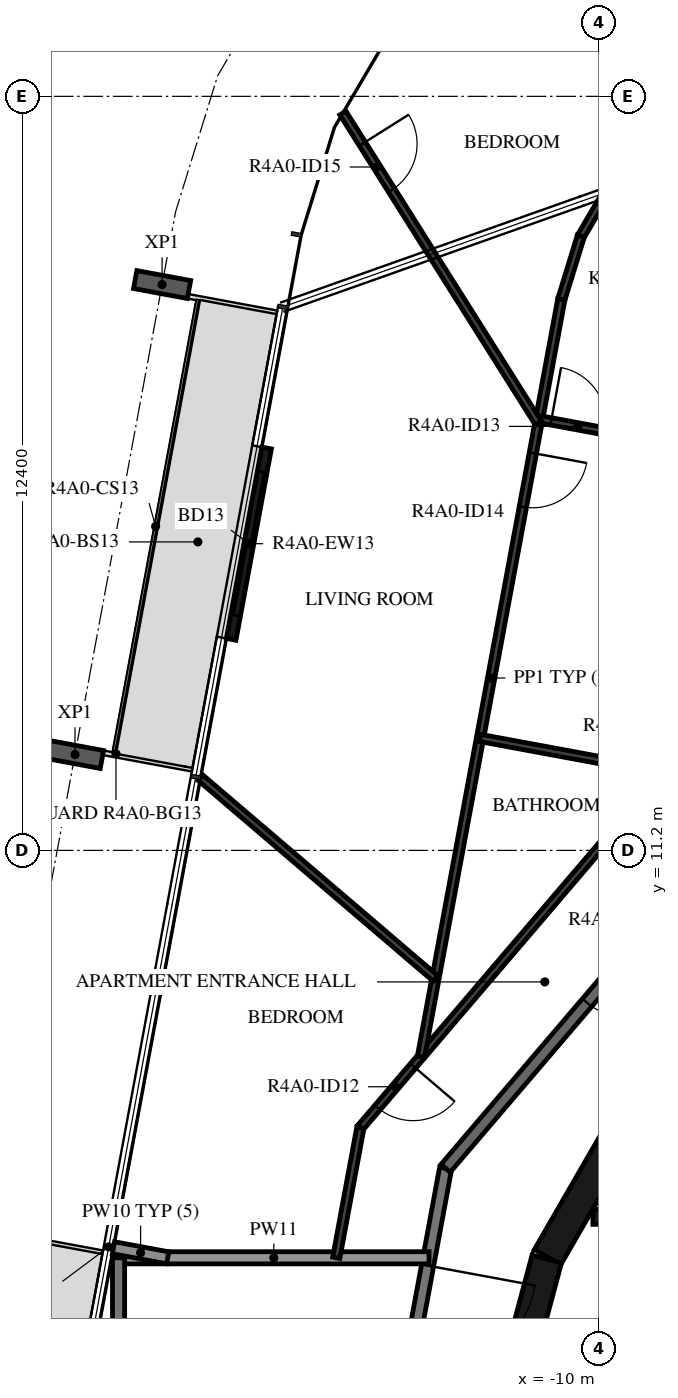
"""IFC4 building model, lengths in metres.
Left out: names, types, materials, properties, quantities, classifications, styles, units other than length and angle.
Written with IfcOpenShell. Run it as: python <this file> out.ifc"""

import sys

from ifc_helpers import new_model, si_unit, direction, frame, frame_2d, origin, origin_2d, place, context, subcontext, project, spatial, rectangle, i_section, extrude, element, fill, save


model = new_model("IFC4")
c1 = context("Model", 3, precision=1e-05, world=origin(), true_north=direction((0.0, 1.0)))
c2 = subcontext(c1, "Body", "Model", "MODEL_VIEW")
j1 = project(units=[si_unit("LENGTHUNIT", "METRE"), si_unit("PLANEANGLEUNIT", "RADIAN")], contexts=[c1])
p1 = place(None, origin())
s1 = spatial("IfcSite", under=j1, at=p1, CompositionType="ELEMENT")
p2 = place(p1, origin())
s2 = spatial("IfcBuilding", under=s1, at=p2, CompositionType="ELEMENT")
p3 = place(p2, frame((0.0, 0.0, 158.7)))
s3 = spatial("IfcBuildingStorey", under=s2, at=p3, CompositionType="ELEMENT", Elevation=158.7)
for number, where, z_axis, x_axis in (
    (1, (-17.184, 20.505, -0.38), (0.0, 0.0, 1.0), (0.182, 0.983, 0.0)),
    (2, (-18.616, 12.777, -0.38), (0.0, 0.0, 1.0), (0.182, 0.983, 0.0)),
):
    element("IfcColumn", number, at=place(p3, frame(where, z_axis=z_axis, x_axis=x_axis)), inside=s3, PredefinedType="COLUMN", context=c2, shape_type="SweptSolid", body=[
        extrude(i_section(OverallWidth=0.3, OverallDepth=0.9, WebThickness=0.019, FlangeThickness=0.035, FilletRadius=0.03, at=origin_2d()), origin(), (0.0, 0.0, 1.0), 3.5),
    ])
p4 = place(p3, frame((-15.465, 17.817, 0.0), z_axis=(0.0, 0.0, 1.0), x_axis=(-0.182201278434, -0.983261254264, 0.0)))
e3 = element("IfcWall", 3, at=p4, inside=s3, PredefinedType="STANDARD", context=c2, shape_type="SweptSolid", body=[
    extrude(rectangle(XDim=3.2, YDim=0.16, at=frame_2d((1.6, 0.0))), origin(), (0.0, 0.0, 1.0), 3.12),
])
p5 = place(p4, frame((0.4, 0.0, 0.0)))
e4 = element("IfcOpeningElement", 4, at=p5, cuts=e3, PredefinedType="OPENING", context=c2, shape_type="SweptSolid", body=[
    extrude(rectangle(XDim=2.4, YDim=2.4, at=frame_2d((1.2, 1.2))), frame((0.0, 0.09, 0.0), z_axis=(0.0, -1.0, 0.0), x_axis=(1.0, 0.0, 0.0)), (0.0, 0.0, 1.0), 0.18),
])
for number, where, z_axis, x_axis in (
    (5, (-9.329, 7.137, 0.0), (0.0, 0.0, 1.0), (-0.5, -0.866, 0.0)),
    (6, (-10.858, 4.479, 0.0), (0.0, 0.0, 1.0), (-0.259, -0.966, 0.0)),
):
    element("IfcWall", number, at=place(p3, frame(where, z_axis=z_axis, x_axis=x_axis)), inside=s3, PredefinedType="SHEAR", context=c2, shape_type="SweptSolid", body=[
        extrude(rectangle(XDim=3.033, YDim=0.5, at=frame_2d((1.516, 0.0))), origin(), (0.0, 0.0, 1.0), 3.12),
    ])
p6 = place(p3, frame((-7.0, 5.175, 0.0), z_axis=(0.0, 0.0, 1.0), x_axis=(-1.0, 0.0, 0.0)))
e7 = element("IfcWall", 7, at=p6, inside=s3, PredefinedType="SHEAR", context=c2, shape_type="SweptSolid", body=[
    extrude(rectangle(XDim=3.1, YDim=0.25, at=frame_2d((1.55, 0.0))), origin(), (0.0, 0.0, 1.0), 3.12),
])
p7 = place(p3, frame((-12.521, 5.972, 0.0), z_axis=(0.0, 0.0, 1.0), x_axis=(-0.182251559718, -0.983251935661, 0.0)))
e8 = element("IfcWall", 8, at=p7, inside=s3, PredefinedType="STANDARD", context=c2, shape_type="SweptSolid", body=[
    extrude(rectangle(XDim=5.117, YDim=0.2, at=frame_2d((2.559, 0.0))), origin(), (0.0, 0.0, 1.0), 3.12),
])
p8 = place(p7, frame((1.627, 0.0, 0.0)))
e9 = element("IfcOpeningElement", 9, at=p8, cuts=e8, PredefinedType="OPENING", context=c2, shape_type="SweptSolid", body=[
    extrude(rectangle(XDim=1.8, YDim=2.1, at=frame_2d((0.9, 1.05))), frame((0.0, 0.11, 0.0), z_axis=(0.0, -1.0, 0.0), x_axis=(1.0, 0.0, 0.0)), (0.0, 0.0, 1.0), 0.22),
])
p9 = place(p3, frame((-7.858, 11.433, 0.0), z_axis=(0.0, 0.0, 1.0), x_axis=(-0.649440801937, -0.760412154545, 0.0)))
e10 = element("IfcWall", 10, at=p9, inside=s3, PredefinedType="STANDARD", context=c2, shape_type="SweptSolid", body=[
    extrude(rectangle(XDim=7.181, YDim=0.2, at=frame_2d((3.59, 0.0))), origin(), (0.0, 0.0, 1.0), 3.12),
])
p10 = place(p9, frame((2.6, 0.0, 0.0)))
e11 = element("IfcOpeningElement", 11, at=p10, cuts=e10, PredefinedType="OPENING", context=c2, shape_type="SweptSolid", body=[
    extrude(rectangle(XDim=1.0, YDim=2.1, at=frame_2d((0.5, 1.05))), frame((0.0, 0.11, 0.0), z_axis=(0.0, -1.0, 0.0), x_axis=(1.0, 0.0, 0.0)), (0.0, 0.0, 1.0), 0.22),
])
p11 = place(p3, frame((-12.794, 4.5, 0.0), z_axis=(0.0, 0.0, 1.0), x_axis=(-1.0, 0.0, 0.0)))
e12 = element("IfcWall", 12, at=p11, inside=s3, PredefinedType="STANDARD", context=c2, shape_type="SweptSolid", body=[
    extrude(rectangle(XDim=5.106, YDim=0.2, at=frame_2d((2.553, 0.0))), origin(), (0.0, 0.0, 1.0), 2.73),
])
p12 = place(p3, frame((-17.9, 4.5, 0.0), z_axis=(0.0, 0.0, 1.0), x_axis=(0.0, -1.0, 0.0)))
e13 = element("IfcWall", 13, at=p12, inside=s3, PredefinedType="STANDARD", context=c2, shape_type="SweptSolid", body=[
    extrude(rectangle(XDim=9.0, YDim=0.2, at=frame_2d((4.5, 0.0))), origin(), (0.0, 0.0, 1.0), 3.12),
])
p13 = place(p3, frame((-17.984, 4.665, 0.0), z_axis=(0.0, 0.0, 1.0), x_axis=(0.98328378843, -0.182079629313, 0.0)))
e14 = element("IfcWall", 14, at=p13, inside=s3, PredefinedType="STANDARD", context=c2, shape_type="SweptSolid", body=[
    extrude(rectangle(XDim=0.908, YDim=0.2, at=frame_2d((0.454, 0.0))), origin(), (0.0, 0.0, 1.0), 2.73),
])
p14 = place(p3, frame((-8.929, 12.488, 0.0), z_axis=(0.0, 0.0, 1.0), x_axis=(-0.64944646045, -0.760407321775, 0.0)))
e15 = element("IfcWall", 15, at=p14, inside=s3, PredefinedType="PARTITIONING", context=c2, shape_type="SweptSolid", body=[
    extrude(rectangle(XDim=7.69, YDim=0.12, at=frame_2d((3.845, 0.0))), origin(), (0.0, 0.0, 1.0), 3.12),
])
p15 = place(p14, frame((0.4, 0.0, 0.0)))
e16 = element("IfcOpeningElement", 16, at=p15, cuts=e15, PredefinedType="OPENING", context=c2, shape_type="SweptSolid", body=[
    extrude(rectangle(XDim=0.8, YDim=2.1, at=frame_2d((0.4, 1.05))), frame((0.0, 0.07, 0.0), z_axis=(0.0, -1.0, 0.0), x_axis=(1.0, 0.0, 0.0)), (0.0, 0.0, 1.0), 0.14),
])
p16 = place(p14, frame((6.356, 0.0, 0.0)))
e17 = element("IfcOpeningElement", 17, at=p16, cuts=e15, PredefinedType="OPENING", context=c2, shape_type="SweptSolid", body=[
    extrude(rectangle(XDim=0.9, YDim=2.1, at=frame_2d((0.45, 1.05))), frame((0.0, 0.07, 0.0), z_axis=(0.0, -1.0, 0.0), x_axis=(1.0, 0.0, 0.0)), (0.0, 0.0, 1.0), 0.14),
])
p17 = place(p3, frame((-13.923, 6.641, 0.0), z_axis=(0.0, 0.0, 1.0), x_axis=(-0.182209715759, -0.983259690765, 0.0)))
e18 = element("IfcWall", 18, at=p17, inside=s3, PredefinedType="PARTITIONING", context=c2, shape_type="SweptSolid", body=[
    extrude(rectangle(XDim=2.177, YDim=0.12, at=frame_2d((1.089, 0.0))), origin(), (0.0, 0.0, 1.0), 3.12),
])
p18 = place(p3, frame((-9.877, 22.014, 0.0), z_axis=(0.0, 0.0, 1.0), x_axis=(-0.507766478099, -0.861494749676, 0.0)))
e19 = element("IfcWall", 19, at=p18, inside=s3, PredefinedType="PARTITIONING", context=c2, shape_type="SweptSolid", body=[
    extrude(rectangle(XDim=0.829, YDim=0.12, at=frame_2d((0.415, 0.0))), origin(), (0.0, 0.0, 1.0), 3.12),
])
p19 = place(p3, frame((-10.298, 21.3, 0.0), z_axis=(0.0, 0.0, 1.0), x_axis=(-0.295127342945, -0.955457927617, 0.0)))
e20 = element("IfcWall", 20, at=p19, inside=s3, PredefinedType="PARTITIONING", context=c2, shape_type="SweptSolid", body=[
    extrude(rectangle(XDim=1.087, YDim=0.12, at=frame_2d((0.543, 0.0))), origin(), (0.0, 0.0, 1.0), 3.12),
])
p20 = place(p3, frame((-10.618, 20.262, 0.0), z_axis=(0.0, 0.0, 1.0), x_axis=(-0.182222468274, -0.983257327487, 0.0)))
e21 = element("IfcWall", 21, at=p20, inside=s3, PredefinedType="PARTITIONING", context=c2, shape_type="SweptSolid", body=[
    extrude(rectangle(XDim=12.667, YDim=0.12, at=frame_2d((6.333, 0.0))), origin(), (0.0, 0.0, 1.0), 3.12),
])
p21 = place(p20, frame((2.57, 0.0, 0.0)))
e22 = element("IfcOpeningElement", 22, at=p21, cuts=e21, PredefinedType="OPENING", context=c2, shape_type="SweptSolid", body=[
    extrude(rectangle(XDim=0.9, YDim=2.1, at=frame_2d((0.45, 1.05))), frame((0.0, 0.07, 0.0), z_axis=(0.0, -1.0, 0.0), x_axis=(1.0, 0.0, 0.0)), (0.0, 0.0, 1.0), 0.14),
])
p22 = place(p3, frame((-10.984, 18.291, 0.0), z_axis=(0.0, 0.0, 1.0), x_axis=(0.98324782266, -0.182273748068, 0.0)))
e23 = element("IfcWall", 23, at=p22, inside=s3, PredefinedType="PARTITIONING", context=c2, shape_type="SweptSolid", body=[
    extrude(rectangle(XDim=4.881, YDim=0.12, at=frame_2d((2.44, 0.0))), origin(), (0.0, 0.0, 1.0), 3.12),
])
p23 = place(p22, frame((0.2, 0.0, 0.0)))
e24 = element("IfcOpeningElement", 24, at=p23, cuts=e23, PredefinedType="OPENING", context=c2, shape_type="SweptSolid", body=[
    extrude(rectangle(XDim=0.9, YDim=2.1, at=frame_2d((0.45, 1.05))), frame((0.0, 0.07, 0.0), z_axis=(0.0, -1.0, 0.0), x_axis=(1.0, 0.0, 0.0)), (0.0, 0.0, 1.0), 0.14),
])
p24 = place(p3, frame((-14.211, 23.326, 0.0), z_axis=(0.0, 0.0, 1.0), x_axis=(0.533278244906, -0.845939899467, 0.0)))
e25 = element("IfcWall", 25, at=p24, inside=s3, PredefinedType="PARTITIONING", context=c2, shape_type="SweptSolid", body=[
    extrude(rectangle(XDim=6.029, YDim=0.12, at=frame_2d((3.014, 0.0))), origin(), (0.0, 0.0, 1.0), 3.12),
])
p25 = place(p24, frame((0.6, 0.0, 0.0)))
e26 = element("IfcOpeningElement", 26, at=p25, cuts=e25, PredefinedType="OPENING", context=c2, shape_type="SweptSolid", body=[
    extrude(rectangle(XDim=0.9, YDim=2.1, at=frame_2d((0.45, 1.05))), frame((0.0, 0.07, 0.0), z_axis=(0.0, -1.0, 0.0), x_axis=(1.0, 0.0, 0.0)), (0.0, 0.0, 1.0), 0.14),
])
p26 = place(p3, frame((-11.955, 13.049, 0.0), z_axis=(0.0, 0.0, 1.0), x_axis=(0.983247271586, -0.182276720725, 0.0)))
e27 = element("IfcWall", 27, at=p26, inside=s3, PredefinedType="PARTITIONING", context=c2, shape_type="SweptSolid", body=[
    extrude(rectangle(XDim=3.078, YDim=0.12, at=frame_2d((1.539, 0.0))), origin(), (0.0, 0.0, 1.0), 3.12),
])
p27 = place(p3, frame((-16.552, 12.394, 0.0), z_axis=(0.0, 0.0, 1.0), x_axis=(0.760425586578, -0.649425074414, 0.0)))
e28 = element("IfcWall", 28, at=p27, inside=s3, PredefinedType="PARTITIONING", context=c2, shape_type="SweptSolid", body=[
    extrude(rectangle(XDim=5.081, YDim=0.12, at=frame_2d((2.541, 0.0))), origin(), (0.0, 0.0, 1.0), 3.12),
])
p28 = place(p5, origin())
e29 = element("IfcDoor", 29, at=p28, inside=s3, OperationType="DOUBLE_DOOR_SLIDING", PredefinedType="DOOR", context=c2, shape_type="SweptSolid", body=[
    extrude(rectangle(XDim=2.4, YDim=2.4, at=frame_2d((1.2, 1.2))), frame((0.0, 0.025, 0.0), z_axis=(0.0, -1.0, 0.0), x_axis=(1.0, 0.0, 0.0)), (0.0, 0.0, 1.0), 0.05),
])
fill(e4, e29)
p29 = place(p10, origin())
e30 = element("IfcDoor", 30, at=p29, inside=s3, OperationType="SINGLE_SWING_LEFT", PredefinedType="DOOR", context=c2, shape_type="SweptSolid", body=[
    extrude(rectangle(XDim=1.0, YDim=2.1, at=frame_2d((0.5, 1.05))), frame((0.0, 0.025, 0.0), z_axis=(0.0, -1.0, 0.0), x_axis=(1.0, 0.0, 0.0)), (0.0, 0.0, 1.0), 0.05),
])
fill(e11, e30)
p30 = place(p16, origin())
e31 = element("IfcDoor", 31, at=p30, inside=s3, OperationType="SINGLE_SWING_LEFT", PredefinedType="DOOR", context=c2, shape_type="SweptSolid", body=[
    extrude(rectangle(XDim=0.9, YDim=2.1, at=frame_2d((0.45, 1.05))), frame((0.0, 0.025, 0.0), z_axis=(0.0, -1.0, 0.0), x_axis=(1.0, 0.0, 0.0)), (0.0, 0.0, 1.0), 0.05),
])
fill(e17, e31)
p31 = place(p23, origin())
e32 = element("IfcDoor", 32, at=p31, inside=s3, OperationType="SINGLE_SWING_LEFT", PredefinedType="DOOR", context=c2, shape_type="SweptSolid", body=[
    extrude(rectangle(XDim=0.9, YDim=2.1, at=frame_2d((0.45, 1.05))), frame((0.0, 0.025, 0.0), z_axis=(0.0, -1.0, 0.0), x_axis=(1.0, 0.0, 0.0)), (0.0, 0.0, 1.0), 0.05),
])
fill(e24, e32)
p32 = place(p21, origin())
e33 = element("IfcDoor", 33, at=p32, inside=s3, OperationType="SINGLE_SWING_LEFT", PredefinedType="DOOR", context=c2, shape_type="SweptSolid", body=[
    extrude(rectangle(XDim=0.9, YDim=2.1, at=frame_2d((0.45, 1.05))), frame((0.0, 0.025, 0.0), z_axis=(0.0, -1.0, 0.0), x_axis=(1.0, 0.0, 0.0)), (0.0, 0.0, 1.0), 0.05),
])
fill(e22, e33)
p33 = place(p25, origin())
e34 = element("IfcDoor", 34, at=p33, inside=s3, OperationType="SINGLE_SWING_LEFT", PredefinedType="DOOR", context=c2, shape_type="SweptSolid", body=[
    extrude(rectangle(XDim=0.9, YDim=2.1, at=frame_2d((0.45, 1.05))), frame((0.0, 0.025, 0.0), z_axis=(0.0, -1.0, 0.0), x_axis=(1.0, 0.0, 0.0)), (0.0, 0.0, 1.0), 0.05),
])
fill(e26, e34)
p34 = place(p8, origin())
e35 = element("IfcDoor", 35, at=p34, inside=s3, OperationType="DOUBLE_DOOR_SINGLE_SWING", PredefinedType="DOOR", context=c2, shape_type="SweptSolid", body=[
    extrude(rectangle(XDim=1.8, YDim=2.1, at=frame_2d((0.9, 1.05))), frame((0.0, 0.025, 0.0), z_axis=(0.0, -1.0, 0.0), x_axis=(1.0, 0.0, 0.0)), (0.0, 0.0, 1.0), 0.05),
])
fill(e9, e35)
save(model, sys.argv[1])
